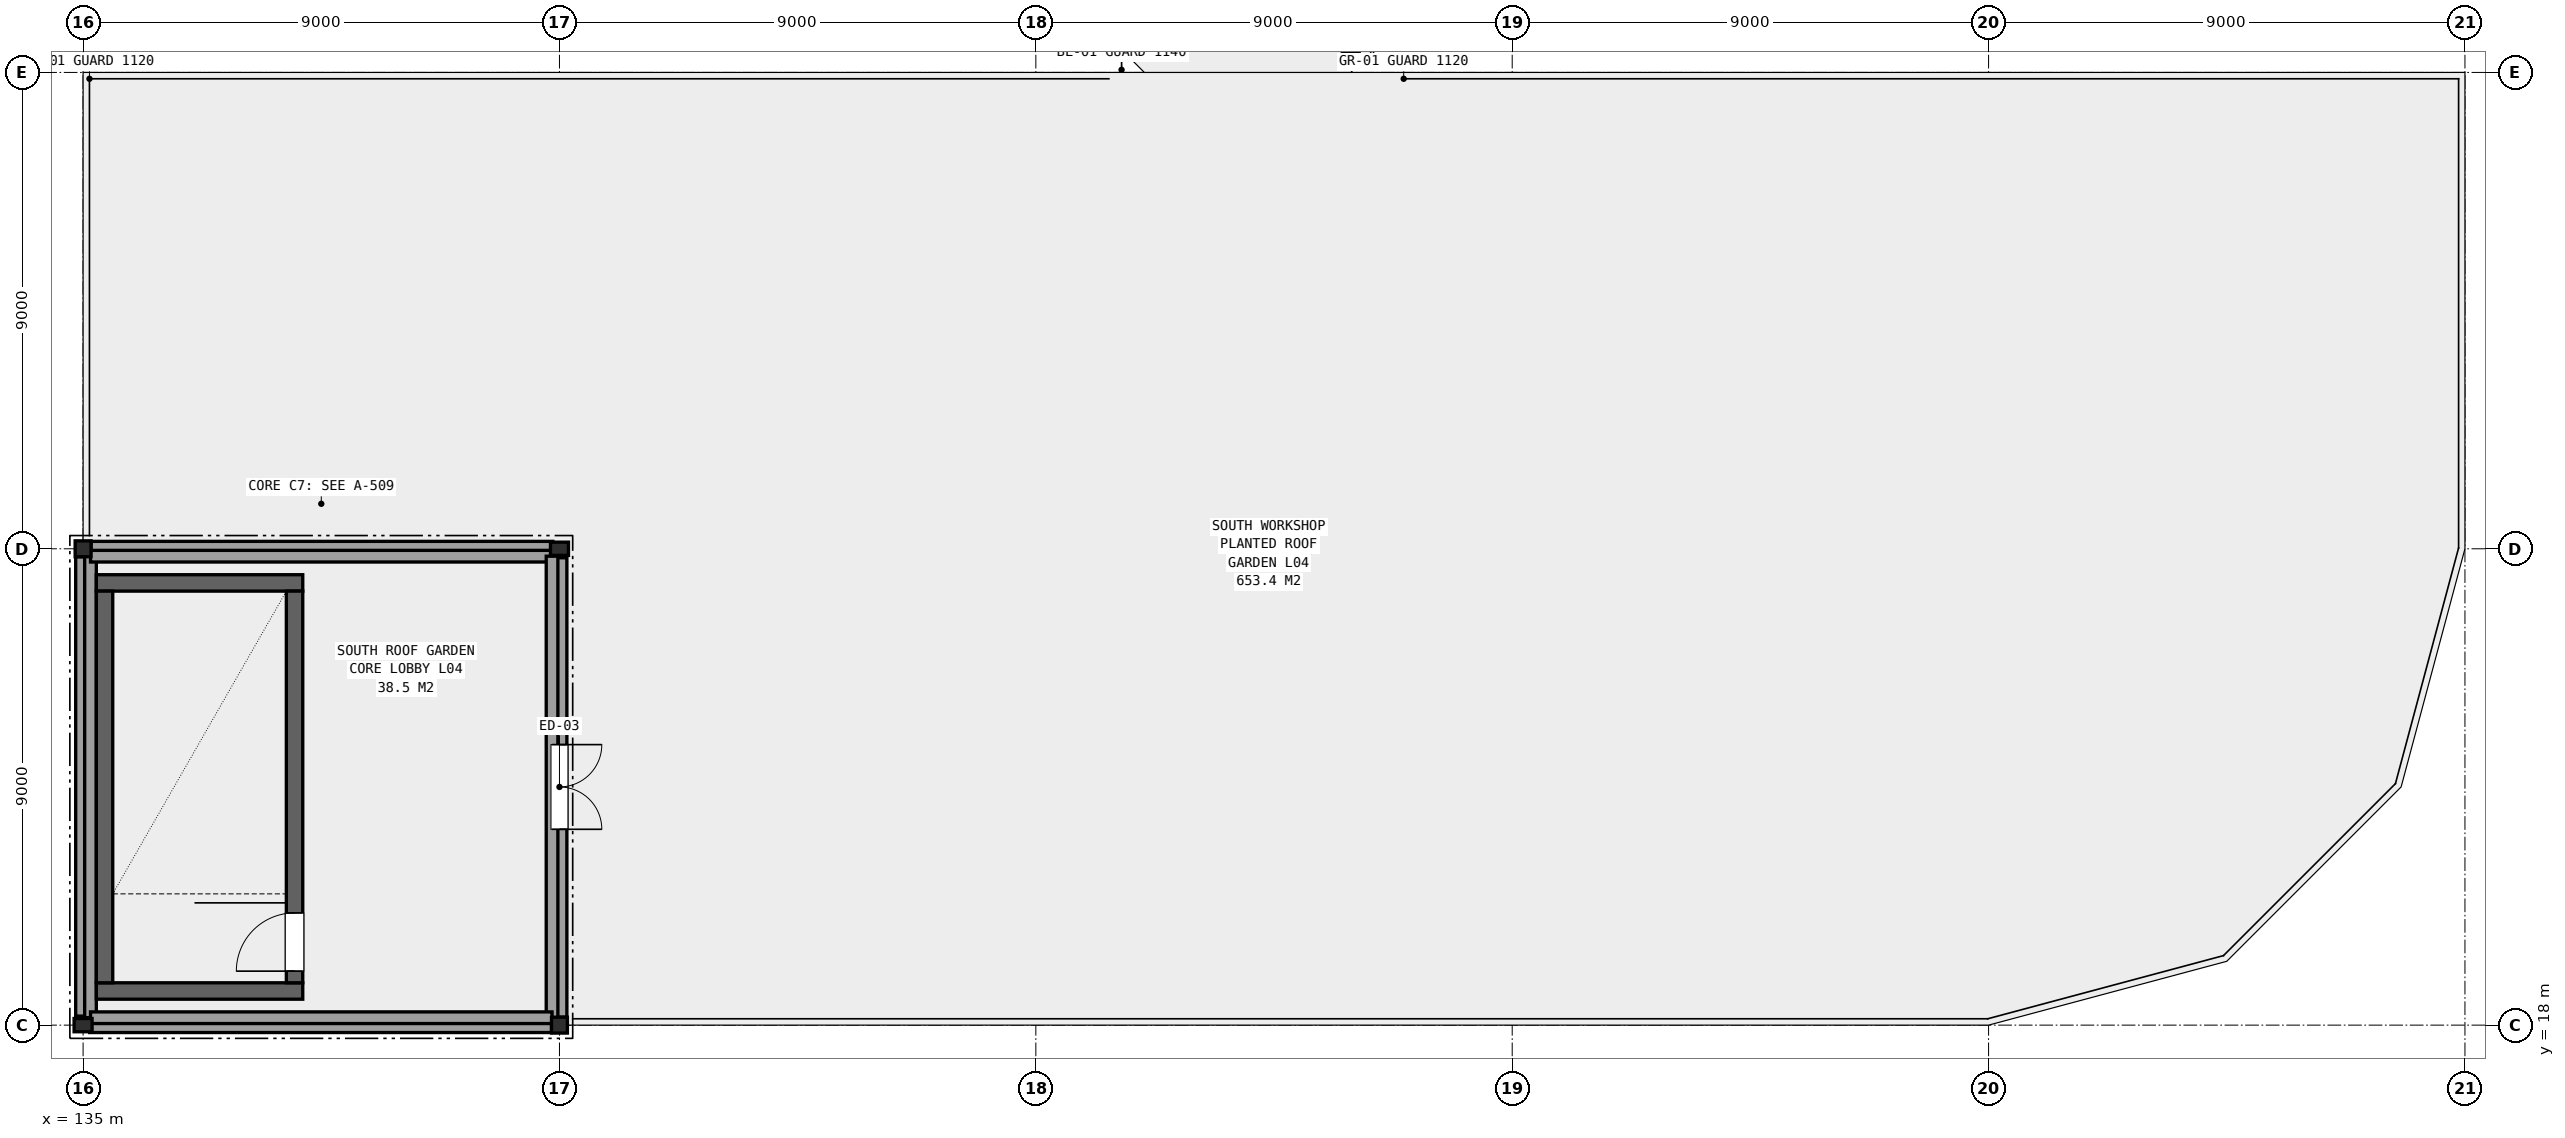
"""IFC4 building model, lengths in metres.
Left out: names, types, materials, properties, quantities, classifications, styles, units other than length and angle.
Written with IfcOpenShell. Run it as: python <this file> out.ifc"""

import sys

from ifc_helpers import new_model, si_unit, direction, frame, frame_2d, origin, origin_2d, place, context, subcontext, project, spatial, rectangle, hollow_rectangle, i_section, extrude, element, fill, save


model = new_model("IFC4")
c1 = context("Model", 3, precision=1e-05, world=origin(), true_north=direction((0.0, 1.0)))
c2 = subcontext(c1, "Body", "Model", "MODEL_VIEW")
j1 = project(units=[si_unit("LENGTHUNIT", "METRE"), si_unit("PLANEANGLEUNIT", "RADIAN")], contexts=[c1])
p1 = place(None, origin())
s1 = spatial("IfcSite", under=j1, at=p1, CompositionType="ELEMENT")
p2 = place(p1, origin())
s2 = spatial("IfcBuilding", under=s1, at=p2, CompositionType="ELEMENT")
p3 = place(p2, frame((0.0, 0.0, 17.7)))
s3 = spatial("IfcBuildingStorey", under=s2, at=p3, CompositionType="ELEMENT", Elevation=17.7)
p4 = place(p3, frame((135.0, 18.0, 0.0), z_axis=(0.0, 0.0, 1.0), x_axis=(1.0, 0.0, 0.0)))
e1 = element("IfcColumn", 1, at=p4, inside=s3, PredefinedType="COLUMN", context=c2, shape_type="SweptSolid", body=[
    extrude(i_section(OverallWidth=0.25, OverallDepth=0.34, WebThickness=0.009, FlangeThickness=0.014, FilletRadius=0.01, at=origin_2d()), origin(), (0.0, 0.0, 1.0), 4.14),
])
for number, where, z_axis, x_axis in (
    (2, (135.0, 27.0, 0.0), (0.0, 0.0, 1.0), (1.0, 0.0, 0.0)),
    (3, (144.0, 18.0, 0.0), (0.0, 0.0, 1.0), (1.0, 0.0, 0.0)),
):
    element("IfcColumn", number, at=place(p3, frame(where, z_axis=z_axis, x_axis=x_axis)), inside=s3, PredefinedType="COLUMN", context=c2, shape_type="SweptSolid", body=[
        extrude(hollow_rectangle(XDim=0.3, YDim=0.3, WallThickness=0.012, at=origin_2d()), origin(), (0.0, 0.0, 1.0), 4.14),
    ])
p5 = place(p3, frame((144.0, 27.0, 0.0), z_axis=(0.0, 0.0, 1.0), x_axis=(1.0, 0.0, 0.0)))
e4 = element("IfcColumn", 4, at=p5, inside=s3, PredefinedType="COLUMN", context=c2, shape_type="SweptSolid", body=[
    extrude(i_section(OverallWidth=0.25, OverallDepth=0.34, WebThickness=0.009, FlangeThickness=0.014, FilletRadius=0.01, at=origin_2d()), origin(), (0.0, 0.0, 1.0), 4.14),
])
for number, where, z_axis, x_axis in (
    (5, (135.125, 18.0, 0.0), (0.0, 0.0, 1.0), (1.0, 0.0, 0.0)),
    (6, (143.875, 27.0, 0.0), (0.0, 0.0, 1.0), (-1.0, 0.0, 0.0)),
):
    element("IfcWall", number, at=place(p3, frame(where, z_axis=z_axis, x_axis=x_axis)), inside=s3, PredefinedType="SOLIDWALL", context=c2, shape_type="SweptSolid", body=[
        extrude(rectangle(XDim=8.725, YDim=0.28, at=frame_2d((4.363, 0.0))), origin(), (0.0, 0.0, 1.0), 3.55),
    ])
p6 = place(p3, frame((135.0, 18.17, 0.0), z_axis=(0.0, 0.0, 1.0), x_axis=(0.0, 1.0, 0.0)))
e7 = element("IfcWall", 7, at=p6, inside=s3, PredefinedType="SOLIDWALL", context=c2, shape_type="SweptSolid", body=[
    extrude(rectangle(XDim=8.68, YDim=0.28, at=frame_2d((4.34, 0.0))), origin(), (0.0, 0.0, 1.0), 3.55),
])
p7 = place(p3, frame((144.0, 18.15, 0.0), z_axis=(0.0, 0.0, 1.0), x_axis=(0.0, 1.0, 0.0)))
e8 = element("IfcWall", 8, at=p7, inside=s3, PredefinedType="SOLIDWALL", context=c2, shape_type="SweptSolid", body=[
    extrude(rectangle(XDim=8.68, YDim=0.28, at=frame_2d((4.34, 0.0))), origin(), (0.0, 0.0, 1.0), 3.55),
])
p8 = place(p7, frame((5.15, 0.0, 0.0), z_axis=(0.0, 0.0, 1.0), x_axis=(-1.0, 0.0, 0.0)))
e9 = element("IfcOpeningElement", 9, at=p8, cuts=e8, PredefinedType="OPENING", context=c2, shape_type="SweptSolid", body=[
    extrude(rectangle(XDim=1.6, YDim=2.2, at=frame_2d((0.8, 1.1))), frame((0.0, 0.151, 0.0), z_axis=(0.0, -1.0, 0.0), x_axis=(1.0, 0.0, 0.0)), (0.0, 0.0, 1.0), 0.302),
])
for number, where, z_axis, x_axis in (
    (10, (135.14, 18.14, 4.2), (0.0, 0.0, 1.0), (0.0, 1.0, 0.0)),
    (11, (135.14, 26.86, 4.2), (0.0, 0.0, 1.0), (1.0, 0.0, 0.0)),
    (12, (143.86, 26.86, 4.2), (0.0, 0.0, 1.0), (0.0, -1.0, 0.0)),
    (13, (143.86, 18.14, 4.2), (0.0, 0.0, 1.0), (-1.0, 0.0, 0.0)),
):
    element("IfcWall", number, at=place(p3, frame(where, z_axis=z_axis, x_axis=x_axis)), inside=s3, PredefinedType="PARAPET", context=c2, shape_type="SweptSolid", body=[
        extrude(rectangle(XDim=8.72, YDim=0.22, at=frame_2d((4.36, 0.0))), origin(), (0.0, 0.0, 1.0), 0.52),
    ])
for number, where, z_axis, x_axis in (
    (14, (135.25, 18.645, 0.0), (0.0, 0.0, 1.0), (1.0, 0.0, 0.0)),
    (15, (135.25, 26.355, 0.0), (0.0, 0.0, 1.0), (1.0, 0.0, 0.0)),
):
    element("IfcWall", number, at=place(p3, frame(where, z_axis=z_axis, x_axis=x_axis)), inside=s3, PredefinedType="SHEAR", context=c2, shape_type="SweptSolid", body=[
        extrude(rectangle(XDim=3.9, YDim=0.31, at=frame_2d((1.95, 0.0))), origin(), (0.0, 0.0, 1.0), 3.94),
    ])
p9 = place(p3, frame((135.405, 18.8, 0.0), z_axis=(0.0, 0.0, 1.0), x_axis=(0.0, 1.0, 0.0)))
e16 = element("IfcWall", 16, at=p9, inside=s3, PredefinedType="SHEAR", context=c2, shape_type="SweptSolid", body=[
    extrude(rectangle(XDim=7.4, YDim=0.31, at=frame_2d((3.7, 0.0))), origin(), (0.0, 0.0, 1.0), 3.94),
])
p10 = place(p3, frame((138.995, 18.8, 0.0), z_axis=(0.0, 0.0, 1.0), x_axis=(0.0, 1.0, 0.0)))
e17 = element("IfcWall", 17, at=p10, inside=s3, PredefinedType="SHEAR", context=c2, shape_type="SweptSolid", body=[
    extrude(rectangle(XDim=7.4, YDim=0.31, at=frame_2d((3.7, 0.0))), origin(), (0.0, 0.0, 1.0), 3.94),
])
p11 = place(p10, frame((0.22, 0.0, 0.0)))
e18 = element("IfcOpeningElement", 18, at=p11, cuts=e17, PredefinedType="OPENING", context=c2, shape_type="SweptSolid", body=[
    extrude(rectangle(XDim=1.1, YDim=2.15, at=frame_2d((0.55, 1.075))), frame((0.0, 0.166, 0.0), z_axis=(0.0, -1.0, 0.0), x_axis=(1.0, 0.0, 0.0)), (0.0, 0.0, 1.0), 0.332),
])
p12 = place(p8, origin())
e19 = element("IfcDoor", 19, at=p12, inside=s3, OperationType="SINGLE_SWING_LEFT", PredefinedType="DOOR", context=c2, shape_type="SweptSolid", body=[
    extrude(rectangle(XDim=1.6, YDim=2.2, at=frame_2d((0.8, 1.1))), frame((0.0, 0.025, 0.0), z_axis=(0.0, -1.0, 0.0), x_axis=(1.0, 0.0, 0.0)), (0.0, 0.0, 1.0), 0.05),
])
fill(e9, e19)
p13 = place(p11, origin())
e20 = element("IfcDoor", 20, at=p13, inside=s3, OperationType="SINGLE_SWING_LEFT", PredefinedType="DOOR", context=c2, shape_type="SweptSolid", body=[
    extrude(rectangle(XDim=1.1, YDim=2.15, at=frame_2d((0.55, 1.075))), frame((0.0, 0.025, 0.0), z_axis=(0.0, -1.0, 0.0), x_axis=(1.0, 0.0, 0.0)), (0.0, 0.0, 1.0), 0.05),
])
fill(e18, e20)
save(model, sys.argv[1])
